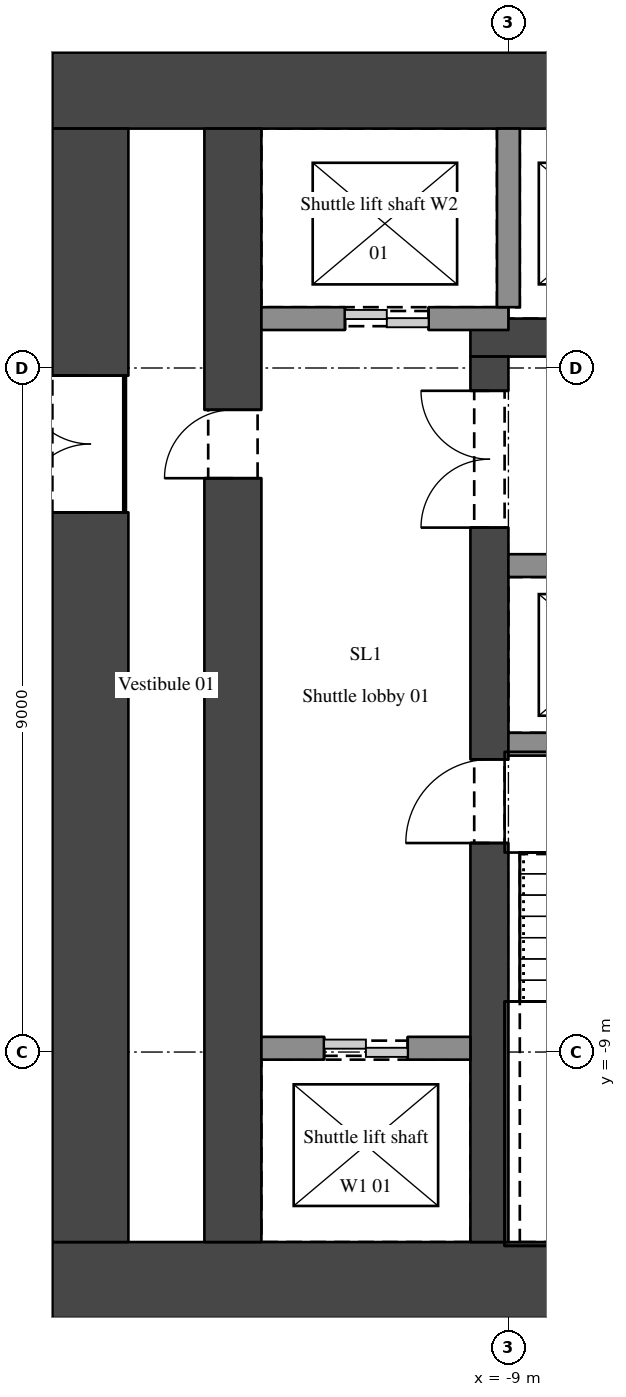
"""IFC4 building model, lengths in metres.
Left out: names, types, materials, properties, quantities, classifications, styles, units other than length and angle.
Written with IfcOpenShell. Run it as: python <this file> out.ifc"""

import sys

from ifc_helpers import new_model, si_unit, direction, frame, frame_2d, origin, place, context, subcontext, project, spatial, rectangle, extrude, element, fill, save


model = new_model("IFC4")
c1 = context("Model", 3, precision=1e-05, world=origin(), true_north=direction((0.0, 1.0)))
c2 = subcontext(c1, "Body", "Model", "MODEL_VIEW")
j1 = project(units=[si_unit("LENGTHUNIT", "METRE"), si_unit("PLANEANGLEUNIT", "RADIAN")], contexts=[c1])
p1 = place(None, origin())
s1 = spatial("IfcSite", under=j1, at=p1, CompositionType="ELEMENT")
p2 = place(p1, origin())
s2 = spatial("IfcBuilding", under=s1, at=p2, CompositionType="ELEMENT")
p3 = place(p2, frame((0.0, 0.0, 108.9)))
s3 = spatial("IfcBuildingStorey", under=s2, at=p3, CompositionType="ELEMENT", Elevation=108.9)
for number, where, z_axis, x_axis in (
    (1, (-15.0, -12.0, 0.0), (0.0, 0.0, 1.0), (1.0, 0.0, 0.0)),
    (2, (-15.0, 3.65, 0.0), (0.0, 0.0, 1.0), (1.0, 0.0, 0.0)),
):
    element("IfcWall", number, at=place(p3, frame(where, z_axis=z_axis, x_axis=x_axis)), inside=s3, PredefinedType="SHEAR", context=c2, shape_type="SweptSolid", body=[
        extrude(rectangle(XDim=30.0, YDim=1.0, at=frame_2d((15.0, 0.0))), origin(), (0.0, 0.0, 1.0), 5.4),
    ])
p4 = place(p3, frame((-14.5, -11.5, 0.0), z_axis=(0.0, 0.0, 1.0), x_axis=(0.0, 1.0, 0.0)))
e3 = element("IfcWall", 3, at=p4, inside=s3, PredefinedType="SHEAR", context=c2, shape_type="SweptSolid", body=[
    extrude(rectangle(XDim=14.65, YDim=1.0, at=frame_2d((7.325, 0.0))), origin(), (0.0, 0.0, 1.0), 5.4),
])
p5 = place(p4, frame((9.6, 0.0, 0.0)))
e4 = element("IfcOpeningElement", 4, at=p5, cuts=e3, PredefinedType="OPENING", context=c2, shape_type="SweptSolid", body=[
    extrude(rectangle(XDim=1.8, YDim=2.1, at=frame_2d((0.9, 1.05))), frame((0.0, 0.51, 0.0), z_axis=(0.0, -1.0, 0.0), x_axis=(1.0, 0.0, 0.0)), (0.0, 0.0, 1.0), 1.02),
])
p6 = place(p3, frame((-12.625, -11.5, 0.0), z_axis=(0.0, 0.0, 1.0), x_axis=(0.0, 1.0, 0.0)))
e5 = element("IfcWall", 5, at=p6, inside=s3, PredefinedType="SHEAR", context=c2, shape_type="SweptSolid", body=[
    extrude(rectangle(XDim=14.65, YDim=0.75, at=frame_2d((7.325, 0.0))), origin(), (0.0, 0.0, 1.0), 5.4),
])
p7 = place(p6, frame((10.05, 0.0, 0.0)))
e6 = element("IfcOpeningElement", 6, at=p7, cuts=e5, PredefinedType="OPENING", context=c2, shape_type="SweptSolid", body=[
    extrude(rectangle(XDim=0.9, YDim=2.1, at=frame_2d((0.45, 1.05))), frame((0.0, 0.385, 0.0), z_axis=(0.0, -1.0, 0.0), x_axis=(1.0, 0.0, 0.0)), (0.0, 0.0, 1.0), 0.77),
])
p8 = place(p3, frame((-9.5, 0.4, 0.0), z_axis=(0.0, 0.0, 1.0), x_axis=(1.0, 0.0, 0.0)))
e7 = element("IfcWall", 7, at=p8, inside=s3, PredefinedType="SHEAR", context=c2, shape_type="SweptSolid", body=[
    extrude(rectangle(XDim=19.0, YDim=0.5, at=frame_2d((9.5, 0.0))), origin(), (0.0, 0.0, 1.0), 5.4),
])
p9 = place(p8, frame((1.3, 0.0, 0.0)))
e8 = element("IfcOpeningElement", 8, at=p9, cuts=e7, PredefinedType="OPENING", context=c2, shape_type="SweptSolid", body=[
    extrude(rectangle(XDim=1.1, YDim=2.1, at=frame_2d((0.55, 1.05))), frame((0.0, 0.26, 0.0), z_axis=(0.0, -1.0, 0.0), x_axis=(1.0, 0.0, 0.0)), (0.0, 0.0, 1.0), 0.52),
])
p10 = place(p8, frame((4.0, 0.0, 0.0)))
e9 = element("IfcOpeningElement", 9, at=p10, cuts=e7, PredefinedType="OPENING", context=c2, shape_type="SweptSolid", body=[
    extrude(rectangle(XDim=1.1, YDim=2.1, at=frame_2d((0.55, 1.05))), frame((0.0, 0.26, 0.0), z_axis=(0.0, -1.0, 0.0), x_axis=(1.0, 0.0, 0.0)), (0.0, 0.0, 1.0), 0.52),
])
p11 = place(p8, frame((6.7, 0.0, 0.0)))
e10 = element("IfcOpeningElement", 10, at=p11, cuts=e7, PredefinedType="OPENING", context=c2, shape_type="SweptSolid", body=[
    extrude(rectangle(XDim=1.1, YDim=2.1, at=frame_2d((0.55, 1.05))), frame((0.0, 0.26, 0.0), z_axis=(0.0, -1.0, 0.0), x_axis=(1.0, 0.0, 0.0)), (0.0, 0.0, 1.0), 0.52),
])
p12 = place(p8, frame((11.2, 0.0, 0.0)))
e11 = element("IfcOpeningElement", 11, at=p12, cuts=e7, PredefinedType="OPENING", context=c2, shape_type="SweptSolid", body=[
    extrude(rectangle(XDim=1.1, YDim=2.1, at=frame_2d((0.55, 1.05))), frame((0.0, 0.26, 0.0), z_axis=(0.0, -1.0, 0.0), x_axis=(1.0, 0.0, 0.0)), (0.0, 0.0, 1.0), 0.52),
])
p13 = place(p8, frame((13.9, 0.0, 0.0)))
e12 = element("IfcOpeningElement", 12, at=p13, cuts=e7, PredefinedType="OPENING", context=c2, shape_type="SweptSolid", body=[
    extrude(rectangle(XDim=1.1, YDim=2.1, at=frame_2d((0.55, 1.05))), frame((0.0, 0.26, 0.0), z_axis=(0.0, -1.0, 0.0), x_axis=(1.0, 0.0, 0.0)), (0.0, 0.0, 1.0), 0.52),
])
p14 = place(p8, frame((16.6, 0.0, 0.0)))
e13 = element("IfcOpeningElement", 13, at=p14, cuts=e7, PredefinedType="OPENING", context=c2, shape_type="SweptSolid", body=[
    extrude(rectangle(XDim=1.1, YDim=2.1, at=frame_2d((0.55, 1.05))), frame((0.0, 0.26, 0.0), z_axis=(0.0, -1.0, 0.0), x_axis=(1.0, 0.0, 0.0)), (0.0, 0.0, 1.0), 0.52),
])
p15 = place(p3, frame((-9.25, -11.5, 0.0), z_axis=(0.0, 0.0, 1.0), x_axis=(0.0, 1.0, 0.0)))
e14 = element("IfcWall", 14, at=p15, inside=s3, PredefinedType="SHEAR", context=c2, shape_type="SweptSolid", body=[
    extrude(rectangle(XDim=11.65, YDim=0.5, at=frame_2d((5.825, 0.0))), origin(), (0.0, 0.0, 1.0), 5.4),
])
p16 = place(p15, frame((9.4, 0.0, 0.0)))
e15 = element("IfcOpeningElement", 15, at=p16, cuts=e14, PredefinedType="OPENING", context=c2, shape_type="SweptSolid", body=[
    extrude(rectangle(XDim=1.8, YDim=2.1, at=frame_2d((0.9, 1.05))), frame((0.0, 0.26, 0.0), z_axis=(0.0, -1.0, 0.0), x_axis=(1.0, 0.0, 0.0)), (0.0, 0.0, 1.0), 0.52),
])
p17 = place(p15, frame((5.25, 0.0, 0.0)))
e16 = element("IfcOpeningElement", 16, at=p17, cuts=e14, PredefinedType="OPENING", context=c2, shape_type="SweptSolid", body=[
    extrude(rectangle(XDim=1.1, YDim=2.1, at=frame_2d((0.55, 1.05))), frame((0.0, 0.26, 0.0), z_axis=(0.0, -1.0, 0.0), x_axis=(1.0, 0.0, 0.0)), (0.0, 0.0, 1.0), 0.52),
])
p18 = place(p3, frame((-12.25, -8.95, 0.0), z_axis=(0.0, 0.0, 1.0), x_axis=(1.0, 0.0, 0.0)))
e17 = element("IfcWall", 17, at=p18, inside=s3, PredefinedType="SHEAR", context=c2, shape_type="SweptSolid", body=[
    extrude(rectangle(XDim=2.75, YDim=0.3, at=frame_2d((1.375, 0.0))), origin(), (0.0, 0.0, 1.0), 5.4),
])
p19 = place(p18, frame((0.825, 0.0, 0.0)))
e18 = element("IfcOpeningElement", 18, at=p19, cuts=e17, PredefinedType="OPENING", context=c2, shape_type="SweptSolid", body=[
    extrude(rectangle(XDim=1.1, YDim=2.1, at=frame_2d((0.55, 1.05))), frame((0.0, 0.16, 0.0), z_axis=(0.0, -1.0, 0.0), x_axis=(1.0, 0.0, 0.0)), (0.0, 0.0, 1.0), 0.32),
])
p20 = place(p3, frame((-9.0, -4.95, 0.0), z_axis=(0.0, 0.0, 1.0), x_axis=(1.0, 0.0, 0.0)))
e19 = element("IfcWall", 19, at=p20, inside=s3, PredefinedType="SHEAR", context=c2, shape_type="SweptSolid", body=[
    extrude(rectangle(XDim=8.1, YDim=0.3, at=frame_2d((4.05, 0.0))), origin(), (0.0, 0.0, 1.0), 5.4),
])
p21 = place(p3, frame((-9.0, -2.6, 0.0), z_axis=(0.0, 0.0, 1.0), x_axis=(1.0, 0.0, 0.0)))
e20 = element("IfcWall", 20, at=p21, inside=s3, PredefinedType="SHEAR", context=c2, shape_type="SweptSolid", body=[
    extrude(rectangle(XDim=8.1, YDim=0.3, at=frame_2d((4.05, 0.0))), origin(), (0.0, 0.0, 1.0), 5.4),
])
p22 = place(p21, frame((0.8, 0.0, 0.0)))
e21 = element("IfcOpeningElement", 21, at=p22, cuts=e20, PredefinedType="OPENING", context=c2, shape_type="SweptSolid", body=[
    extrude(rectangle(XDim=1.1, YDim=2.1, at=frame_2d((0.55, 1.05))), frame((0.0, 0.16, 0.0), z_axis=(0.0, -1.0, 0.0), x_axis=(1.0, 0.0, 0.0)), (0.0, 0.0, 1.0), 0.32),
])
p23 = place(p21, frame((3.5, 0.0, 0.0)))
e22 = element("IfcOpeningElement", 22, at=p23, cuts=e20, PredefinedType="OPENING", context=c2, shape_type="SweptSolid", body=[
    extrude(rectangle(XDim=1.1, YDim=2.1, at=frame_2d((0.55, 1.05))), frame((0.0, 0.16, 0.0), z_axis=(0.0, -1.0, 0.0), x_axis=(1.0, 0.0, 0.0)), (0.0, 0.0, 1.0), 0.32),
])
p24 = place(p21, frame((6.2, 0.0, 0.0)))
e23 = element("IfcOpeningElement", 23, at=p24, cuts=e20, PredefinedType="OPENING", context=c2, shape_type="SweptSolid", body=[
    extrude(rectangle(XDim=1.1, YDim=2.1, at=frame_2d((0.55, 1.05))), frame((0.0, 0.16, 0.0), z_axis=(0.0, -1.0, 0.0), x_axis=(1.0, 0.0, 0.0)), (0.0, 0.0, 1.0), 0.32),
])
p25 = place(p3, frame((-9.0, 0.65, 0.0), z_axis=(0.0, 0.0, 1.0), x_axis=(-1.0, 0.0, 0.0)))
e24 = element("IfcWall", 24, at=p25, inside=s3, PredefinedType="SHEAR", context=c2, shape_type="SweptSolid", body=[
    extrude(rectangle(XDim=3.25, YDim=0.3, at=frame_2d((1.625, 0.0))), origin(), (0.0, 0.0, 1.0), 5.4),
])
p26 = place(p25, frame((1.05, 0.0, 0.0)))
e25 = element("IfcOpeningElement", 25, at=p26, cuts=e24, PredefinedType="OPENING", context=c2, shape_type="SweptSolid", body=[
    extrude(rectangle(XDim=1.1, YDim=2.1, at=frame_2d((0.55, 1.05))), frame((0.0, 0.16, 0.0), z_axis=(0.0, -1.0, 0.0), x_axis=(1.0, 0.0, 0.0)), (0.0, 0.0, 1.0), 0.32),
])
p27 = place(p3, frame((-9.0, 0.8, 0.0), z_axis=(0.0, 0.0, 1.0), x_axis=(0.0, 1.0, 0.0)))
e26 = element("IfcWall", 26, at=p27, inside=s3, PredefinedType="SHEAR", context=c2, shape_type="SweptSolid", body=[
    extrude(rectangle(XDim=2.35, YDim=0.3, at=frame_2d((1.175, 0.0))), origin(), (0.0, 0.0, 1.0), 5.4),
])
p28 = place(p5, origin())
e27 = element("IfcDoor", 27, at=p28, inside=s3, OperationType="DOUBLE_DOOR_SINGLE_SWING", PredefinedType="DOOR", context=c2, shape_type="SweptSolid", body=[
    extrude(rectangle(XDim=1.8, YDim=2.1, at=frame_2d((0.9, 1.05))), frame((0.0, 0.025, 0.0), z_axis=(0.0, -1.0, 0.0), x_axis=(1.0, 0.0, 0.0)), (0.0, 0.0, 1.0), 0.05),
])
fill(e4, e27)
p29 = place(p16, origin())
e28 = element("IfcDoor", 28, at=p29, inside=s3, OperationType="DOUBLE_DOOR_SINGLE_SWING", PredefinedType="DOOR", context=c2, shape_type="SweptSolid", body=[
    extrude(rectangle(XDim=1.8, YDim=2.1, at=frame_2d((0.9, 1.05))), frame((0.0, 0.025, 0.0), z_axis=(0.0, -1.0, 0.0), x_axis=(1.0, 0.0, 0.0)), (0.0, 0.0, 1.0), 0.05),
])
fill(e15, e28)
p30 = place(p17, origin())
e29 = element("IfcDoor", 29, at=p30, inside=s3, OperationType="SINGLE_SWING_LEFT", PredefinedType="DOOR", context=c2, shape_type="SweptSolid", body=[
    extrude(rectangle(XDim=1.1, YDim=2.1, at=frame_2d((0.55, 1.05))), frame((0.0, 0.025, 0.0), z_axis=(0.0, -1.0, 0.0), x_axis=(1.0, 0.0, 0.0)), (0.0, 0.0, 1.0), 0.05),
])
fill(e16, e29)
p31 = place(p7, origin())
e30 = element("IfcDoor", 30, at=p31, inside=s3, OperationType="SINGLE_SWING_LEFT", PredefinedType="DOOR", context=c2, shape_type="SweptSolid", body=[
    extrude(rectangle(XDim=0.9, YDim=2.1, at=frame_2d((0.45, 1.05))), frame((0.0, 0.025, 0.0), z_axis=(0.0, -1.0, 0.0), x_axis=(1.0, 0.0, 0.0)), (0.0, 0.0, 1.0), 0.05),
])
fill(e6, e30)
p32 = place(p26, origin())
e31 = element("IfcDoor", 31, at=p32, inside=s3, OperationType="DOUBLE_DOOR_SLIDING", PredefinedType="DOOR", context=c2, shape_type="SweptSolid", body=[
    extrude(rectangle(XDim=1.1, YDim=2.1, at=frame_2d((0.55, 1.05))), frame((0.0, 0.025, 0.0), z_axis=(0.0, -1.0, 0.0), x_axis=(1.0, 0.0, 0.0)), (0.0, 0.0, 1.0), 0.05),
])
fill(e25, e31)
p33 = place(p19, origin())
e32 = element("IfcDoor", 32, at=p33, inside=s3, OperationType="DOUBLE_DOOR_SLIDING", PredefinedType="DOOR", context=c2, shape_type="SweptSolid", body=[
    extrude(rectangle(XDim=1.1, YDim=2.1, at=frame_2d((0.55, 1.05))), frame((0.0, 0.025, 0.0), z_axis=(0.0, -1.0, 0.0), x_axis=(1.0, 0.0, 0.0)), (0.0, 0.0, 1.0), 0.05),
])
fill(e18, e32)
save(model, sys.argv[1])
